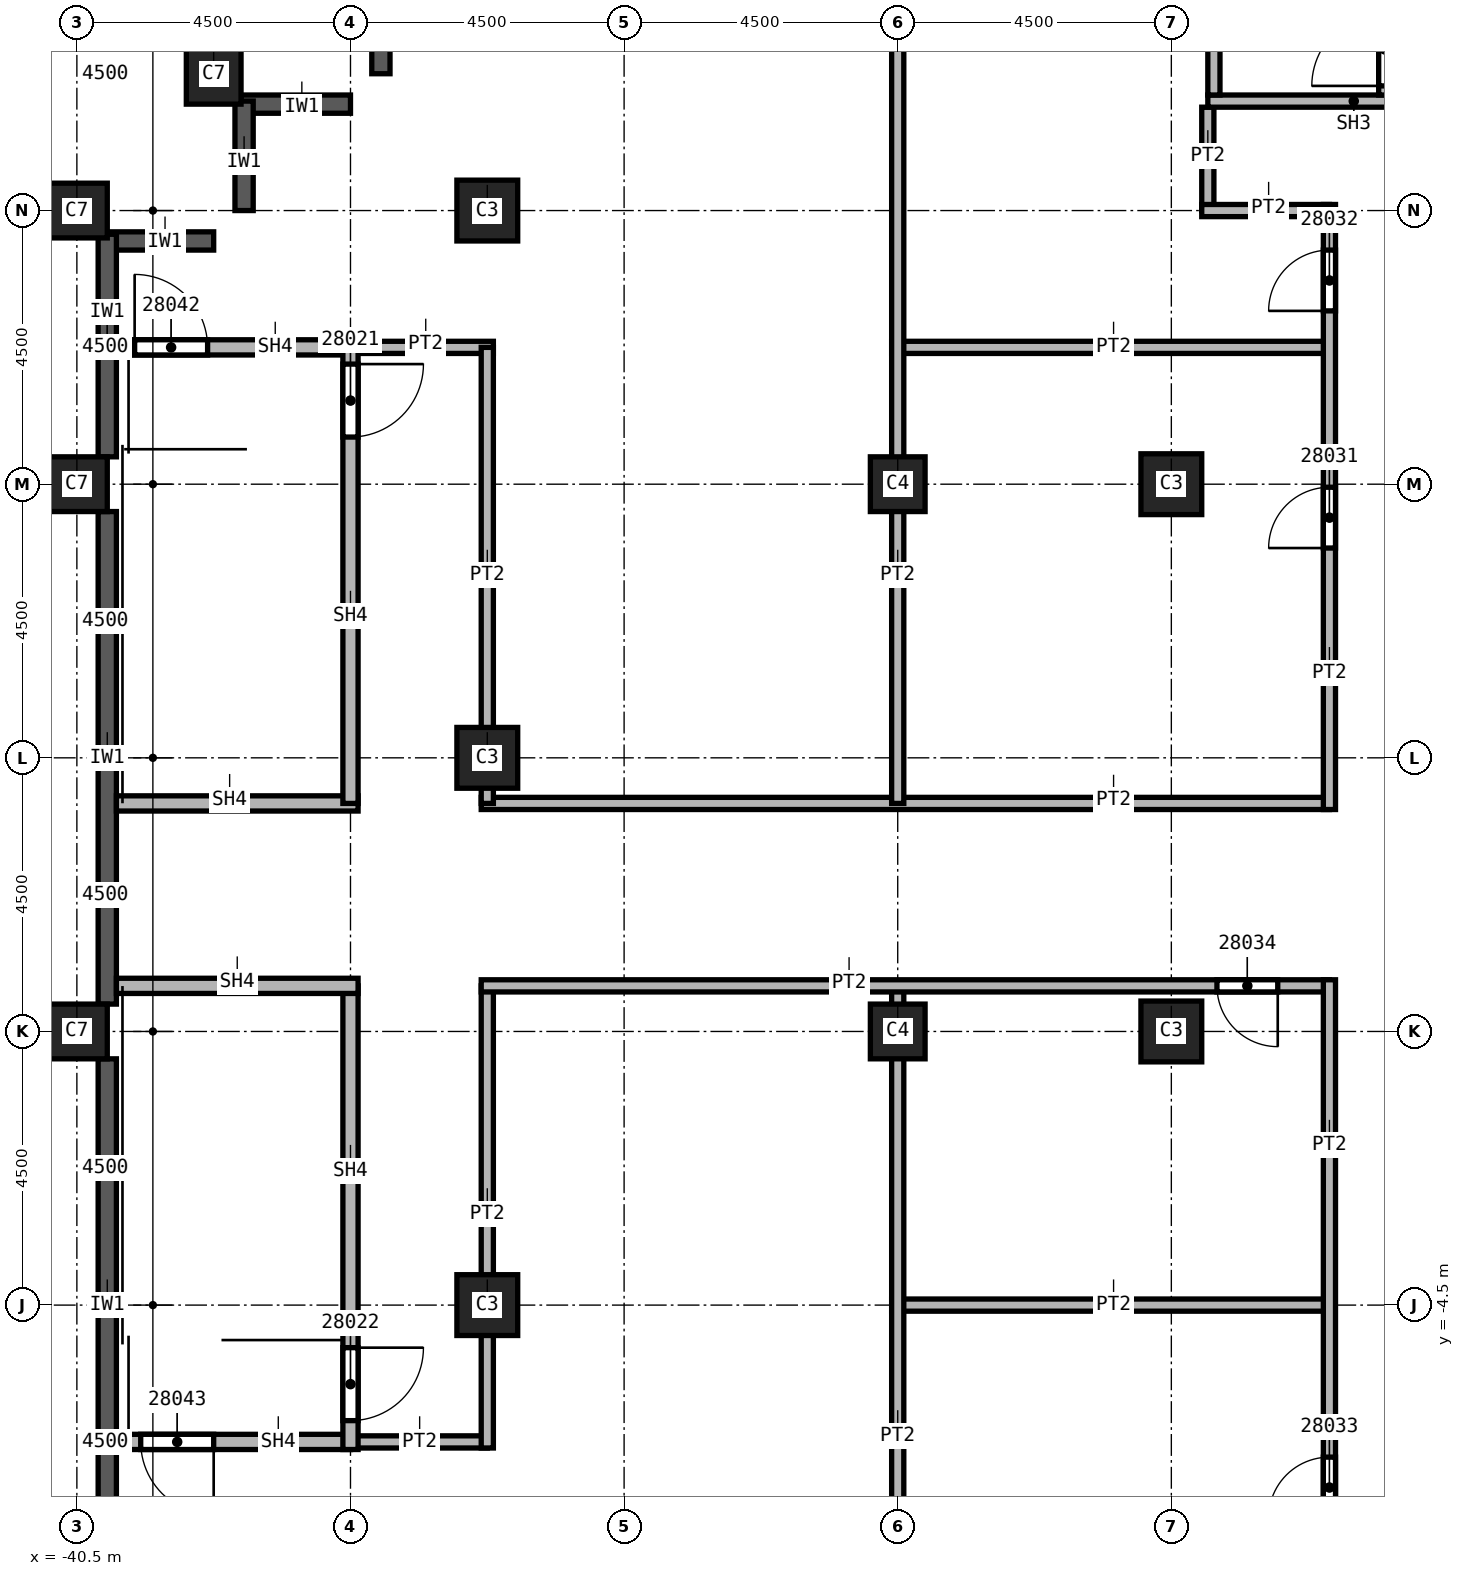
"""IFC4 building model, lengths in metres.
Left out: names, types, materials, properties, quantities, classifications, styles, units other than length and angle.
Written with IfcOpenShell. Run it as: python <this file> out.ifc"""

import sys

from ifc_helpers import new_model, si_unit, direction, frame, frame_2d, origin, origin_2d, place, context, subcontext, project, spatial, rectangle, extrude, element, fill, save


model = new_model("IFC4")
c1 = context("Model", 3, precision=1e-05, world=origin(), true_north=direction((0.0, 1.0)))
c2 = subcontext(c1, "Body", "Model", "MODEL_VIEW")
j1 = project(units=[si_unit("LENGTHUNIT", "METRE"), si_unit("PLANEANGLEUNIT", "RADIAN")], contexts=[c1])
p1 = place(None, origin())
s1 = spatial("IfcSite", under=j1, at=p1, CompositionType="ELEMENT")
p2 = place(p1, origin())
s2 = spatial("IfcBuilding", under=s1, at=p2, CompositionType="ELEMENT")
p3 = place(p2, frame((0.0, 0.0, 236.0)))
s3 = spatial("IfcBuildingStorey", under=s2, at=p3, CompositionType="ELEMENT", Elevation=236.0)
for number, where, z_axis, x_axis in (
    (1, (-40.5, 0.0, 0.0), (0.0, 0.0, 1.0), (0.0, 1.0, 0.0)),
    (2, (-40.5, 9.0, 0.0), (0.0, 0.0, 1.0), (0.0, 1.0, 0.0)),
    (3, (-40.5, 13.5, 0.0), (0.0, 0.0, 1.0), (0.0, 1.0, 0.0)),
    (4, (-38.25, 15.75, 0.0), (0.0, 0.0, 1.0), (1.0, 0.0, 0.0)),
):
    element("IfcColumn", number, at=place(p3, frame(where, z_axis=z_axis, x_axis=x_axis)), inside=s3, PredefinedType="COLUMN", context=c2, shape_type="SweptSolid", body=[
        extrude(rectangle(XDim=0.9, YDim=1.0, at=origin_2d()), origin(), (0.0, 0.0, 1.0), 5.72),
    ])
for number, where, z_axis, x_axis in (
    (5, (-33.75, 4.5, 0.0), (0.0, 0.0, 1.0), (1.0, 0.0, 0.0)),
    (6, (-33.75, 13.5, 0.0), (0.0, 0.0, 1.0), (1.0, 0.0, 0.0)),
    (7, (-33.75, -4.5, 0.0), (0.0, 0.0, 1.0), (1.0, 0.0, 0.0)),
    (8, (-22.5, 0.0, 0.0), (0.0, 0.0, 1.0), (1.0, 0.0, 0.0)),
    (9, (-22.5, 9.0, 0.0), (0.0, 0.0, 1.0), (1.0, 0.0, 0.0)),
):
    element("IfcColumn", number, at=place(p3, frame(where, z_axis=z_axis, x_axis=x_axis)), inside=s3, PredefinedType="COLUMN", context=c2, shape_type="SweptSolid", body=[
        extrude(rectangle(XDim=1.0, YDim=1.0, at=origin_2d()), origin(), (0.0, 0.0, 1.0), 5.72),
    ])
for number, where, z_axis, x_axis in (
    (10, (-27.0, 0.0, 0.0), (0.0, 0.0, 1.0), (1.0, 0.0, 0.0)),
    (11, (-27.0, 9.0, 0.0), (0.0, 0.0, 1.0), (1.0, 0.0, 0.0)),
):
    element("IfcColumn", number, at=place(p3, frame(where, z_axis=z_axis, x_axis=x_axis)), inside=s3, PredefinedType="COLUMN", context=c2, shape_type="SweptSolid", body=[
        extrude(rectangle(XDim=0.9, YDim=0.9, at=origin_2d()), origin(), (0.0, 0.0, 1.0), 5.72),
    ])
for number, where, z_axis, x_axis in (
    (12, (-35.5, 17.55, 0.0), (0.0, 0.0, 1.0), (0.0, -1.0, 0.0)),
    (13, (-37.8, 15.25, 0.0), (0.0, 0.0, 1.0), (1.0, 0.0, 0.0)),
    (14, (-37.75, 15.3, 0.0), (0.0, 0.0, 1.0), (0.0, -1.0, 0.0)),
):
    element("IfcWall", number, at=place(p3, frame(where, z_axis=z_axis, x_axis=x_axis)), inside=s3, PredefinedType="SOLIDWALL", context=c2, shape_type="SweptSolid", body=[
        extrude(rectangle(XDim=1.8, YDim=0.3, at=frame_2d((0.9, 0.0))), origin(), (0.0, 0.0, 1.0), 5.12),
    ])
p4 = place(p3, frame((-40.0, 13.0, 0.0), z_axis=(0.0, 0.0, 1.0), x_axis=(1.0, 0.0, 0.0)))
e15 = element("IfcWall", 15, at=p4, inside=s3, PredefinedType="SOLIDWALL", context=c2, shape_type="SweptSolid", body=[
    extrude(rectangle(XDim=1.75, YDim=0.3, at=frame_2d((0.875, 0.0))), origin(), (0.0, 0.0, 1.0), 5.12),
])
p5 = place(p3, frame((-40.0, 13.11, 0.0), z_axis=(0.0, 0.0, 1.0), x_axis=(0.0, -1.0, 0.0)))
e16 = element("IfcWall", 16, at=p5, inside=s3, PredefinedType="SOLIDWALL", context=c2, shape_type="SweptSolid", body=[
    extrude(rectangle(XDim=3.66, YDim=0.3, at=frame_2d((1.83, 0.0))), origin(), (0.0, 0.0, 1.0), 5.12),
])
for number, where, z_axis, x_axis in (
    (17, (-40.0, 8.55, 0.0), (0.0, 0.0, 1.0), (0.0, -1.0, 0.0)),
    (18, (-40.0, -0.45, 0.0), (0.0, 0.0, 1.0), (0.0, -1.0, 0.0)),
):
    element("IfcWall", number, at=place(p3, frame(where, z_axis=z_axis, x_axis=x_axis)), inside=s3, PredefinedType="SOLIDWALL", context=c2, shape_type="SweptSolid", body=[
        extrude(rectangle(XDim=8.1, YDim=0.3, at=frame_2d((4.05, 0.0))), origin(), (0.0, 0.0, 1.0), 5.12),
    ])
p6 = place(p3, frame((-36.0, 11.25, 0.0), z_axis=(0.0, 0.0, 1.0), x_axis=(1.0, 0.0, 0.0)))
e19 = element("IfcWall", 19, at=p6, inside=s3, PredefinedType="PARTITIONING", context=c2, shape_type="SweptSolid", body=[
    extrude(rectangle(XDim=2.35, YDim=0.2, at=frame_2d((1.175, 0.0))), origin(), (0.0, 0.0, 1.0), 5.72),
])
p7 = place(p3, frame((-33.85, 3.75, 0.0), z_axis=(0.0, 0.0, 1.0), x_axis=(1.0, 0.0, 0.0)))
e20 = element("IfcWall", 20, at=p7, inside=s3, PredefinedType="PARTITIONING", context=c2, shape_type="SweptSolid", body=[
    extrude(rectangle(XDim=13.95, YDim=0.2, at=frame_2d((6.975, 0.0))), origin(), (0.0, 0.0, 1.0), 5.72),
])
p8 = place(p3, frame((-33.75, -6.75, 0.0), z_axis=(0.0, 0.0, 1.0), x_axis=(-1.0, 0.0, 0.0)))
e21 = element("IfcWall", 21, at=p8, inside=s3, PredefinedType="PARTITIONING", context=c2, shape_type="SweptSolid", body=[
    extrude(rectangle(XDim=2.25, YDim=0.2, at=frame_2d((1.125, 0.0))), origin(), (0.0, 0.0, 1.0), 5.72),
])
p9 = place(p3, frame((-33.75, 0.75, 0.0), z_axis=(0.0, 0.0, 1.0), x_axis=(0.0, -1.0, 0.0)))
e22 = element("IfcWall", 22, at=p9, inside=s3, PredefinedType="PARTITIONING", context=c2, shape_type="SweptSolid", body=[
    extrude(rectangle(XDim=7.6, YDim=0.2, at=frame_2d((3.8, 0.0))), origin(), (0.0, 0.0, 1.0), 5.72),
])
p10 = place(p3, frame((-33.75, 11.25, 0.0), z_axis=(0.0, 0.0, 1.0), x_axis=(0.0, -1.0, 0.0)))
e23 = element("IfcWall", 23, at=p10, inside=s3, PredefinedType="PARTITIONING", context=c2, shape_type="SweptSolid", body=[
    extrude(rectangle(XDim=7.5, YDim=0.2, at=frame_2d((3.75, 0.0))), origin(), (0.0, 0.0, 1.0), 5.72),
])
for number, where, z_axis, x_axis in (
    (24, (-27.1, -4.5, 0.0), (0.0, 0.0, 1.0), (1.0, 0.0, 0.0)),
    (25, (-27.1, 11.25, 0.0), (0.0, 0.0, 1.0), (1.0, 0.0, 0.0)),
):
    element("IfcWall", number, at=place(p3, frame(where, z_axis=z_axis, x_axis=x_axis)), inside=s3, PredefinedType="PARTITIONING", context=c2, shape_type="SweptSolid", body=[
        extrude(rectangle(XDim=7.2, YDim=0.2, at=frame_2d((3.6, 0.0))), origin(), (0.0, 0.0, 1.0), 5.72),
    ])
p11 = place(p3, frame((-27.0, -11.25, 0.0), z_axis=(0.0, 0.0, 1.0), x_axis=(0.0, 1.0, 0.0)))
e26 = element("IfcWall", 26, at=p11, inside=s3, PredefinedType="PARTITIONING", context=c2, shape_type="SweptSolid", body=[
    extrude(rectangle(XDim=12.0, YDim=0.2, at=frame_2d((6.0, 0.0))), origin(), (0.0, 0.0, 1.0), 5.72),
])
p12 = place(p3, frame((-27.0, 3.75, 0.0), z_axis=(0.0, 0.0, 1.0), x_axis=(0.0, 1.0, 0.0)))
e27 = element("IfcWall", 27, at=p12, inside=s3, PredefinedType="PARTITIONING", context=c2, shape_type="SweptSolid", body=[
    extrude(rectangle(XDim=13.75, YDim=0.2, at=frame_2d((6.875, 0.0))), origin(), (0.0, 0.0, 1.0), 5.72),
])
p13 = place(p3, frame((-19.9, 0.75, 0.0), z_axis=(0.0, 0.0, 1.0), x_axis=(-1.0, 0.0, 0.0)))
e28 = element("IfcWall", 28, at=p13, inside=s3, PredefinedType="PARTITIONING", context=c2, shape_type="SweptSolid", body=[
    extrude(rectangle(XDim=13.95, YDim=0.2, at=frame_2d((6.975, 0.0))), origin(), (0.0, 0.0, 1.0), 5.72),
])
p14 = place(p13, frame((0.85, 0.0, 0.0)))
e29 = element("IfcOpeningElement", 29, at=p14, cuts=e28, PredefinedType="OPENING", context=c2, shape_type="SweptSolid", body=[
    extrude(rectangle(XDim=1.0, YDim=2.1, at=frame_2d((0.5, 1.05))), frame((0.0, 0.1, 0.0), z_axis=(0.0, -1.0, 0.0), x_axis=(1.0, 0.0, 0.0)), (0.0, 0.0, 1.0), 0.2),
])
p15 = place(p3, frame((-21.9, 13.5, 0.0), z_axis=(0.0, 0.0, 1.0), x_axis=(0.0, 1.0, 0.0)))
e30 = element("IfcWall", 30, at=p15, inside=s3, PredefinedType="PARTITIONING", context=c2, shape_type="SweptSolid", body=[
    extrude(rectangle(XDim=1.7, YDim=0.2, at=frame_2d((0.85, 0.0))), origin(), (0.0, 0.0, 1.0), 5.72),
])
p16 = place(p3, frame((-19.9, -8.7, 0.0), z_axis=(0.0, 0.0, 1.0), x_axis=(0.0, 1.0, 0.0)))
e31 = element("IfcWall", 31, at=p16, inside=s3, PredefinedType="PARTITIONING", context=c2, shape_type="SweptSolid", body=[
    extrude(rectangle(XDim=9.55, YDim=0.2, at=frame_2d((4.775, 0.0))), origin(), (0.0, 0.0, 1.0), 5.72),
])
p17 = place(p16, frame((0.7, 0.0, 0.0)))
e32 = element("IfcOpeningElement", 32, at=p17, cuts=e31, PredefinedType="OPENING", context=c2, shape_type="SweptSolid", body=[
    extrude(rectangle(XDim=1.0, YDim=2.1, at=frame_2d((0.5, 1.05))), frame((0.0, 0.1, 0.0), z_axis=(0.0, -1.0, 0.0), x_axis=(1.0, 0.0, 0.0)), (0.0, 0.0, 1.0), 0.2),
])
p18 = place(p3, frame((-19.9, 3.65, 0.0), z_axis=(0.0, 0.0, 1.0), x_axis=(0.0, 1.0, 0.0)))
e33 = element("IfcWall", 33, at=p18, inside=s3, PredefinedType="PARTITIONING", context=c2, shape_type="SweptSolid", body=[
    extrude(rectangle(XDim=9.95, YDim=0.2, at=frame_2d((4.975, 0.0))), origin(), (0.0, 0.0, 1.0), 5.72),
])
p19 = place(p18, frame((4.3, 0.0, 0.0)))
e34 = element("IfcOpeningElement", 34, at=p19, cuts=e33, PredefinedType="OPENING", context=c2, shape_type="SweptSolid", body=[
    extrude(rectangle(XDim=1.0, YDim=2.1, at=frame_2d((0.5, 1.05))), frame((0.0, 0.1, 0.0), z_axis=(0.0, -1.0, 0.0), x_axis=(1.0, 0.0, 0.0)), (0.0, 0.0, 1.0), 0.2),
])
p20 = place(p18, frame((8.2, 0.0, 0.0)))
e35 = element("IfcOpeningElement", 35, at=p20, cuts=e33, PredefinedType="OPENING", context=c2, shape_type="SweptSolid", body=[
    extrude(rectangle(XDim=1.0, YDim=2.1, at=frame_2d((0.5, 1.05))), frame((0.0, 0.1, 0.0), z_axis=(0.0, -1.0, 0.0), x_axis=(1.0, 0.0, 0.0)), (0.0, 0.0, 1.0), 0.2),
])
p21 = place(p3, frame((-19.9, 13.5, 0.0), z_axis=(0.0, 0.0, 1.0), x_axis=(-1.0, 0.0, 0.0)))
e36 = element("IfcWall", 36, at=p21, inside=s3, PredefinedType="PARTITIONING", context=c2, shape_type="SweptSolid", body=[
    extrude(rectangle(XDim=2.1, YDim=0.2, at=frame_2d((1.05, 0.0))), origin(), (0.0, 0.0, 1.0), 5.72),
])
p22 = place(p3, frame((-39.85, 3.75, 0.0), z_axis=(0.0, 0.0, 1.0), x_axis=(1.0, 0.0, 0.0)))
e37 = element("IfcWall", 37, at=p22, inside=s3, PredefinedType="SOLIDWALL", context=c2, shape_type="SweptSolid", body=[
    extrude(rectangle(XDim=3.975, YDim=0.25, at=frame_2d((1.988, 0.0))), origin(), (0.0, 0.0, 1.0), 5.72),
])
p23 = place(p3, frame((-39.85, 11.25, 0.0), z_axis=(0.0, 0.0, 1.0), x_axis=(1.0, 0.0, 0.0)))
e38 = element("IfcWall", 38, at=p23, inside=s3, PredefinedType="SOLIDWALL", context=c2, shape_type="SweptSolid", body=[
    extrude(rectangle(XDim=3.85, YDim=0.25, at=frame_2d((1.925, 0.0))), origin(), (0.0, 0.0, 1.0), 5.72),
])
p24 = place(p23, frame((0.3, 0.0, 0.0)))
e39 = element("IfcOpeningElement", 39, at=p24, cuts=e38, PredefinedType="OPENING", context=c2, shape_type="SweptSolid", body=[
    extrude(rectangle(XDim=1.2, YDim=2.1, at=frame_2d((0.6, 1.05))), frame((0.0, 0.125, 0.0), z_axis=(0.0, -1.0, 0.0), x_axis=(1.0, 0.0, 0.0)), (0.0, 0.0, 1.0), 0.25),
])
p25 = place(p3, frame((-36.0, -6.75, 0.0), z_axis=(0.0, 0.0, 1.0), x_axis=(-1.0, 0.0, 0.0)))
e40 = element("IfcWall", 40, at=p25, inside=s3, PredefinedType="SOLIDWALL", context=c2, shape_type="SweptSolid", body=[
    extrude(rectangle(XDim=3.85, YDim=0.25, at=frame_2d((1.925, 0.0))), origin(), (0.0, 0.0, 1.0), 5.72),
])
p26 = place(p25, frame((2.25, 0.0, 0.0)))
e41 = element("IfcOpeningElement", 41, at=p26, cuts=e40, PredefinedType="OPENING", context=c2, shape_type="SweptSolid", body=[
    extrude(rectangle(XDim=1.2, YDim=2.1, at=frame_2d((0.6, 1.05))), frame((0.0, 0.125, 0.0), z_axis=(0.0, -1.0, 0.0), x_axis=(1.0, 0.0, 0.0)), (0.0, 0.0, 1.0), 0.25),
])
p27 = place(p3, frame((-36.0, 0.75, 0.0), z_axis=(0.0, 0.0, 1.0), x_axis=(0.0, -1.0, 0.0)))
e42 = element("IfcWall", 42, at=p27, inside=s3, PredefinedType="SOLIDWALL", context=c2, shape_type="SweptSolid", body=[
    extrude(rectangle(XDim=7.625, YDim=0.25, at=frame_2d((3.812, 0.0))), origin(), (0.0, 0.0, 1.0), 5.72),
])
p28 = place(p27, frame((5.95, 0.0, 0.0)))
e43 = element("IfcOpeningElement", 43, at=p28, cuts=e42, PredefinedType="OPENING", context=c2, shape_type="SweptSolid", body=[
    extrude(rectangle(XDim=1.2, YDim=2.1, at=frame_2d((0.6, 1.05))), frame((0.0, 0.125, 0.0), z_axis=(0.0, -1.0, 0.0), x_axis=(1.0, 0.0, 0.0)), (0.0, 0.0, 1.0), 0.25),
])
p29 = place(p3, frame((-36.0, 11.375, 0.0), z_axis=(0.0, 0.0, 1.0), x_axis=(0.0, -1.0, 0.0)))
e44 = element("IfcWall", 44, at=p29, inside=s3, PredefinedType="SOLIDWALL", context=c2, shape_type="SweptSolid", body=[
    extrude(rectangle(XDim=7.625, YDim=0.25, at=frame_2d((3.812, 0.0))), origin(), (0.0, 0.0, 1.0), 5.72),
])
p30 = place(p29, frame((0.4, 0.0, 0.0)))
e45 = element("IfcOpeningElement", 45, at=p30, cuts=e44, PredefinedType="OPENING", context=c2, shape_type="SweptSolid", body=[
    extrude(rectangle(XDim=1.2, YDim=2.1, at=frame_2d((0.6, 1.05))), frame((0.0, 0.125, 0.0), z_axis=(0.0, -1.0, 0.0), x_axis=(1.0, 0.0, 0.0)), (0.0, 0.0, 1.0), 0.25),
])
p31 = place(p3, frame((-35.875, 0.75, 0.0), z_axis=(0.0, 0.0, 1.0), x_axis=(-1.0, 0.0, 0.0)))
e46 = element("IfcWall", 46, at=p31, inside=s3, PredefinedType="SOLIDWALL", context=c2, shape_type="SweptSolid", body=[
    extrude(rectangle(XDim=3.975, YDim=0.25, at=frame_2d((1.988, 0.0))), origin(), (0.0, 0.0, 1.0), 5.72),
])
p32 = place(p3, frame((-21.9, 15.3, 0.0), z_axis=(0.0, 0.0, 1.0), x_axis=(1.0, 0.0, 0.0)))
e47 = element("IfcWall", 47, at=p32, inside=s3, PredefinedType="SOLIDWALL", context=c2, shape_type="SweptSolid", body=[
    extrude(rectangle(XDim=8.275, YDim=0.2, at=frame_2d((4.137, 0.0))), origin(), (0.0, 0.0, 1.0), 5.72),
])
p33 = place(p32, frame((4.8, 0.0, 0.0)))
e48 = element("IfcOpeningElement", 48, at=p33, cuts=e47, PredefinedType="OPENING", context=c2, shape_type="SweptSolid", body=[
    extrude(rectangle(XDim=1.2, YDim=2.1, at=frame_2d((0.6, 1.05))), frame((0.0, 0.1, 0.0), z_axis=(0.0, -1.0, 0.0), x_axis=(1.0, 0.0, 0.0)), (0.0, 0.0, 1.0), 0.2),
])
p34 = place(p3, frame((-21.8, 15.4, 0.0), z_axis=(0.0, 0.0, 1.0), x_axis=(0.0, 1.0, 0.0)))
e49 = element("IfcWall", 49, at=p34, inside=s3, PredefinedType="SOLIDWALL", context=c2, shape_type="SweptSolid", body=[
    extrude(rectangle(XDim=5.9, YDim=0.2, at=frame_2d((2.95, 0.0))), origin(), (0.0, 0.0, 1.0), 5.72),
])
p35 = place(p3, frame((-18.99, 15.4, 0.0), z_axis=(0.0, 0.0, 1.0), x_axis=(0.0, 1.0, 0.0)))
e50 = element("IfcWall", 50, at=p35, inside=s3, PredefinedType="SOLIDWALL", context=c2, shape_type="SweptSolid", body=[
    extrude(rectangle(XDim=5.9, YDim=0.2, at=frame_2d((2.95, 0.0))), origin(), (0.0, 0.0, 1.0), 5.72),
])
p36 = place(p35, frame((0.15, 0.0, 0.0)))
e51 = element("IfcOpeningElement", 51, at=p36, cuts=e50, PredefinedType="OPENING", context=c2, shape_type="SweptSolid", body=[
    extrude(rectangle(XDim=1.2, YDim=2.1, at=frame_2d((0.6, 1.05))), frame((0.0, 0.1, 0.0), z_axis=(0.0, -1.0, 0.0), x_axis=(1.0, 0.0, 0.0)), (0.0, 0.0, 1.0), 0.2),
])
p37 = place(p30, origin())
e52 = element("IfcDoor", 52, at=p37, inside=s3, OperationType="SINGLE_SWING_RIGHT", PredefinedType="DOOR", context=c2, shape_type="SweptSolid", body=[
    extrude(rectangle(XDim=1.2, YDim=2.1, at=frame_2d((0.6, 1.05))), frame((0.0, 0.025, 0.0), z_axis=(0.0, -1.0, 0.0), x_axis=(1.0, 0.0, 0.0)), (0.0, 0.0, 1.0), 0.05),
])
fill(e45, e52)
p38 = place(p28, origin())
e53 = element("IfcDoor", 53, at=p38, inside=s3, OperationType="SINGLE_SWING_LEFT", PredefinedType="DOOR", context=c2, shape_type="SweptSolid", body=[
    extrude(rectangle(XDim=1.2, YDim=2.1, at=frame_2d((0.6, 1.05))), frame((0.0, 0.025, 0.0), z_axis=(0.0, -1.0, 0.0), x_axis=(1.0, 0.0, 0.0)), (0.0, 0.0, 1.0), 0.05),
])
fill(e43, e53)
p39 = place(p19, origin())
e54 = element("IfcDoor", 54, at=p39, inside=s3, OperationType="SINGLE_SWING_RIGHT", PredefinedType="DOOR", context=c2, shape_type="SweptSolid", body=[
    extrude(rectangle(XDim=1.0, YDim=2.1, at=frame_2d((0.5, 1.05))), frame((0.0, 0.025, 0.0), z_axis=(0.0, -1.0, 0.0), x_axis=(1.0, 0.0, 0.0)), (0.0, 0.0, 1.0), 0.05),
])
fill(e34, e54)
p40 = place(p20, origin())
e55 = element("IfcDoor", 55, at=p40, inside=s3, OperationType="SINGLE_SWING_LEFT", PredefinedType="DOOR", context=c2, shape_type="SweptSolid", body=[
    extrude(rectangle(XDim=1.0, YDim=2.1, at=frame_2d((0.5, 1.05))), frame((0.0, 0.025, 0.0), z_axis=(0.0, -1.0, 0.0), x_axis=(1.0, 0.0, 0.0)), (0.0, 0.0, 1.0), 0.05),
])
fill(e35, e55)
p41 = place(p17, origin())
e56 = element("IfcDoor", 56, at=p41, inside=s3, OperationType="SINGLE_SWING_RIGHT", PredefinedType="DOOR", context=c2, shape_type="SweptSolid", body=[
    extrude(rectangle(XDim=1.0, YDim=2.1, at=frame_2d((0.5, 1.05))), frame((0.0, 0.025, 0.0), z_axis=(0.0, -1.0, 0.0), x_axis=(1.0, 0.0, 0.0)), (0.0, 0.0, 1.0), 0.05),
])
fill(e32, e56)
p42 = place(p14, origin())
e57 = element("IfcDoor", 57, at=p42, inside=s3, OperationType="SINGLE_SWING_LEFT", PredefinedType="DOOR", context=c2, shape_type="SweptSolid", body=[
    extrude(rectangle(XDim=1.0, YDim=2.1, at=frame_2d((0.5, 1.05))), frame((0.0, 0.025, 0.0), z_axis=(0.0, -1.0, 0.0), x_axis=(1.0, 0.0, 0.0)), (0.0, 0.0, 1.0), 0.05),
])
fill(e29, e57)
p43 = place(p24, origin())
e58 = element("IfcDoor", 58, at=p43, inside=s3, OperationType="SINGLE_SWING_LEFT", PredefinedType="DOOR", context=c2, shape_type="SweptSolid", body=[
    extrude(rectangle(XDim=1.2, YDim=2.1, at=frame_2d((0.6, 1.05))), frame((0.0, 0.025, 0.0), z_axis=(0.0, -1.0, 0.0), x_axis=(1.0, 0.0, 0.0)), (0.0, 0.0, 1.0), 0.05),
])
fill(e39, e58)
p44 = place(p26, origin())
e59 = element("IfcDoor", 59, at=p44, inside=s3, OperationType="SINGLE_SWING_RIGHT", PredefinedType="DOOR", context=c2, shape_type="SweptSolid", body=[
    extrude(rectangle(XDim=1.2, YDim=2.1, at=frame_2d((0.6, 1.05))), frame((0.0, 0.025, 0.0), z_axis=(0.0, -1.0, 0.0), x_axis=(1.0, 0.0, 0.0)), (0.0, 0.0, 1.0), 0.05),
])
fill(e41, e59)
p45 = place(p36, origin())
e60 = element("IfcDoor", 60, at=p45, inside=s3, OperationType="SINGLE_SWING_LEFT", PredefinedType="DOOR", context=c2, shape_type="SweptSolid", body=[
    extrude(rectangle(XDim=1.2, YDim=2.1, at=frame_2d((0.6, 1.05))), frame((0.0, 0.025, 0.0), z_axis=(0.0, -1.0, 0.0), x_axis=(1.0, 0.0, 0.0)), (0.0, 0.0, 1.0), 0.05),
])
fill(e51, e60)
save(model, sys.argv[1])
